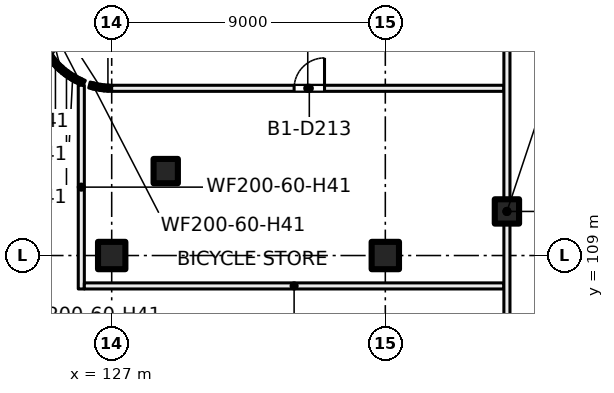
"""IFC4 building model, lengths in metres.
Left out: names, types, materials, properties, quantities, classifications, styles, units other than length and angle.
Written with IfcOpenShell. Run it as: python <this file> out.ifc"""

import sys

from ifc_helpers import new_model, si_unit, direction, frame, frame_2d, origin, origin_2d, place, context, subcontext, project, spatial, rectangle, extrude, element, fill, save


model = new_model("IFC4")
c1 = context("Model", 3, precision=1e-05, world=origin(), true_north=direction((0.0, 1.0)))
c2 = subcontext(c1, "Body", "Model", "MODEL_VIEW")
j1 = project(units=[si_unit("LENGTHUNIT", "METRE"), si_unit("PLANEANGLEUNIT", "RADIAN")], contexts=[c1])
p1 = place(None, origin())
s1 = spatial("IfcSite", under=j1, at=p1, CompositionType="ELEMENT")
p2 = place(p1, origin())
s2 = spatial("IfcBuilding", under=s1, at=p2, CompositionType="ELEMENT")
p3 = place(p2, frame((0.0, 0.0, -4.5)))
s3 = spatial("IfcBuildingStorey", under=s2, at=p3, CompositionType="ELEMENT", Elevation=-4.5)
for number, where, z_axis, x_axis in (
    (1, (127.0, 109.0, 0.0), (0.0, 0.0, 1.0), (1.0, 0.0, 0.0)),
    (2, (136.0, 109.0, 0.0), (0.0, 0.0, 1.0), (1.0, 0.0, 0.0)),
):
    element("IfcColumn", number, at=place(p3, frame(where, z_axis=z_axis, x_axis=x_axis)), inside=s3, PredefinedType="COLUMN", context=c2, shape_type="SweptSolid", body=[
        extrude(rectangle(XDim=0.9, YDim=0.9, at=origin_2d()), origin(), (0.0, 0.0, 1.0), 4.5),
    ])
for number, where, z_axis, x_axis in (
    (3, (128.777, 111.777, 0.0), (0.0, 0.0, 1.0), (1.0, 0.0, 0.0)),
    (4, (140.0, 110.45, 0.0), (0.0, 0.0, 1.0), (1.0, 0.0, 0.0)),
):
    element("IfcColumn", number, at=place(p3, frame(where, z_axis=z_axis, x_axis=x_axis)), inside=s3, PredefinedType="COLUMN", context=c2, shape_type="SweptSolid", body=[
        extrude(rectangle(XDim=0.8, YDim=0.8, at=origin_2d()), origin(), (0.0, 0.0, 1.0), 4.5),
    ])
p4 = place(p3, frame((124.918, 115.615, 0.0), z_axis=(0.0, 0.0, 1.0), x_axis=(0.595707657713, -0.803201336243, 0.0)))
e5 = element("IfcWall", 5, at=p4, inside=s3, PredefinedType="PARTITIONING", context=c2, shape_type="SweptSolid", body=[
    extrude(rectangle(XDim=0.255, YDim=0.2, at=frame_2d((0.128, 0.0))), origin(), (0.0, 0.0, 1.0), 4.1),
])
for number, where, z_axis, x_axis in (
    (6, (125.064, 115.418, 0.0), (0.0, 0.0, 1.0), (0.669, -0.743, 0.0)),
    (7, (125.228, 115.235, 0.0), (0.0, 0.0, 1.0), (0.743, -0.669, 0.0)),
):
    element("IfcWall", number, at=place(p3, frame(where, z_axis=z_axis, x_axis=x_axis)), inside=s3, PredefinedType="PARTITIONING", context=c2, shape_type="SweptSolid", body=[
        extrude(rectangle(XDim=0.256, YDim=0.2, at=frame_2d((0.128, 0.0))), origin(), (0.0, 0.0, 1.0), 4.1),
    ])
p5 = place(p3, frame((125.41, 115.07, 0.0), z_axis=(0.0, 0.0, 1.0), x_axis=(0.803201336243, -0.595707657713, 0.0)))
e8 = element("IfcWall", 8, at=p5, inside=s3, PredefinedType="PARTITIONING", context=c2, shape_type="SweptSolid", body=[
    extrude(rectangle(XDim=0.255, YDim=0.2, at=frame_2d((0.128, 0.0))), origin(), (0.0, 0.0, 1.0), 4.1),
])
p6 = place(p3, frame((125.607, 114.924, 0.0), z_axis=(0.0, 0.0, 1.0), x_axis=(0.857998903579, -0.513651517527, 0.0)))
e9 = element("IfcWall", 9, at=p6, inside=s3, PredefinedType="PARTITIONING", context=c2, shape_type="SweptSolid", body=[
    extrude(rectangle(XDim=0.255, YDim=0.2, at=frame_2d((0.127, 0.0))), origin(), (0.0, 0.0, 1.0), 4.1),
])
p7 = place(p3, frame((125.818, 114.797, 0.0), z_axis=(0.0, 0.0, 1.0), x_axis=(0.902065692634, -0.431598755991, 0.0)))
e10 = element("IfcWall", 10, at=p7, inside=s3, PredefinedType="PARTITIONING", context=c2, shape_type="SweptSolid", body=[
    extrude(rectangle(XDim=0.302, YDim=0.2, at=frame_2d((0.151, 0.0))), origin(), (0.0, 0.0, 1.0), 4.1),
])
p8 = place(p3, frame((126.0, 107.9, 0.0), z_axis=(0.0, 0.0, 1.0), x_axis=(0.0, 1.0, 0.0)))
e11 = element("IfcWall", 11, at=p8, inside=s3, PredefinedType="PARTITIONING", context=c2, shape_type="SweptSolid", body=[
    extrude(rectangle(XDim=6.699, YDim=0.2, at=frame_2d((3.35, 0.0))), origin(), (0.0, 0.0, 1.0), 4.1),
])
p9 = place(p3, frame((126.1, 108.0, 0.0), z_axis=(0.0, 0.0, 1.0), x_axis=(1.0, 0.0, 0.0)))
e12 = element("IfcWall", 12, at=p9, inside=s3, PredefinedType="PARTITIONING", context=c2, shape_type="SweptSolid", body=[
    extrude(rectangle(XDim=13.8, YDim=0.2, at=frame_2d((6.9, 0.0))), origin(), (0.0, 0.0, 1.0), 4.1),
])
p10 = place(p3, frame((126.269, 114.609, 0.0), z_axis=(0.0, 0.0, 1.0), x_axis=(0.970366809683, -0.241636616978, 0.0)))
e13 = element("IfcWall", 13, at=p10, inside=s3, PredefinedType="PARTITIONING", context=c2, shape_type="SweptSolid", body=[
    extrude(rectangle(XDim=0.256, YDim=0.2, at=frame_2d((0.128, 0.0))), origin(), (0.0, 0.0, 1.0), 4.1),
])
p11 = place(p3, frame((126.507, 114.549, 0.0), z_axis=(0.0, 0.0, 1.0), x_axis=(0.988852180426, -0.148900521377, 0.0)))
e14 = element("IfcWall", 14, at=p11, inside=s3, PredefinedType="PARTITIONING", context=c2, shape_type="SweptSolid", body=[
    extrude(rectangle(XDim=0.256, YDim=0.2, at=frame_2d((0.128, 0.0))), origin(), (0.0, 0.0, 1.0), 4.1),
])
p12 = place(p3, frame((126.75, 114.512, 0.0), z_axis=(0.0, 0.0, 1.0), x_axis=(0.998874697667, -0.047427190102, 0.0)))
e15 = element("IfcWall", 15, at=p12, inside=s3, PredefinedType="PARTITIONING", context=c2, shape_type="SweptSolid", body=[
    extrude(rectangle(XDim=0.252, YDim=0.2, at=frame_2d((0.126, 0.0))), origin(), (0.0, 0.0, 1.0), 4.1),
])
p13 = place(p3, frame((139.9, 114.5, 0.0), z_axis=(0.0, 0.0, 1.0), x_axis=(-1.0, 0.0, 0.0)))
e16 = element("IfcWall", 16, at=p13, inside=s3, PredefinedType="PARTITIONING", context=c2, shape_type="SweptSolid", body=[
    extrude(rectangle(XDim=12.902, YDim=0.2, at=frame_2d((6.451, 0.0))), origin(), (0.0, 0.0, 1.0), 4.1),
])
p14 = place(p13, frame((5.9, 0.0, 0.0)))
e17 = element("IfcOpeningElement", 17, at=p14, cuts=e16, PredefinedType="OPENING", context=c2, shape_type="SweptSolid", body=[
    extrude(rectangle(XDim=1.0, YDim=2.1, at=frame_2d((0.5, 1.05))), frame((0.0, 0.11, 0.0), z_axis=(0.0, -1.0, 0.0), x_axis=(1.0, 0.0, 0.0)), (0.0, 0.0, 1.0), 0.22),
])
p15 = place(p3, frame((140.0, 103.9, 0.0), z_axis=(0.0, 0.0, 1.0), x_axis=(0.0, 1.0, 0.0)))
e18 = element("IfcWall", 18, at=p15, inside=s3, PredefinedType="PARTITIONING", context=c2, shape_type="SweptSolid", body=[
    extrude(rectangle(XDim=13.1, YDim=0.2, at=frame_2d((6.55, 0.0))), origin(), (0.0, 0.0, 1.0), 4.1),
])
p16 = place(p14, origin())
e19 = element("IfcDoor", 19, at=p16, inside=s3, OperationType="SINGLE_SWING_LEFT", PredefinedType="DOOR", context=c2, shape_type="SweptSolid", body=[
    extrude(rectangle(XDim=1.0, YDim=2.1, at=frame_2d((0.5, 1.05))), frame((0.0, 0.025, 0.0), z_axis=(0.0, -1.0, 0.0), x_axis=(1.0, 0.0, 0.0)), (0.0, 0.0, 1.0), 0.05),
])
fill(e17, e19)
save(model, sys.argv[1])
